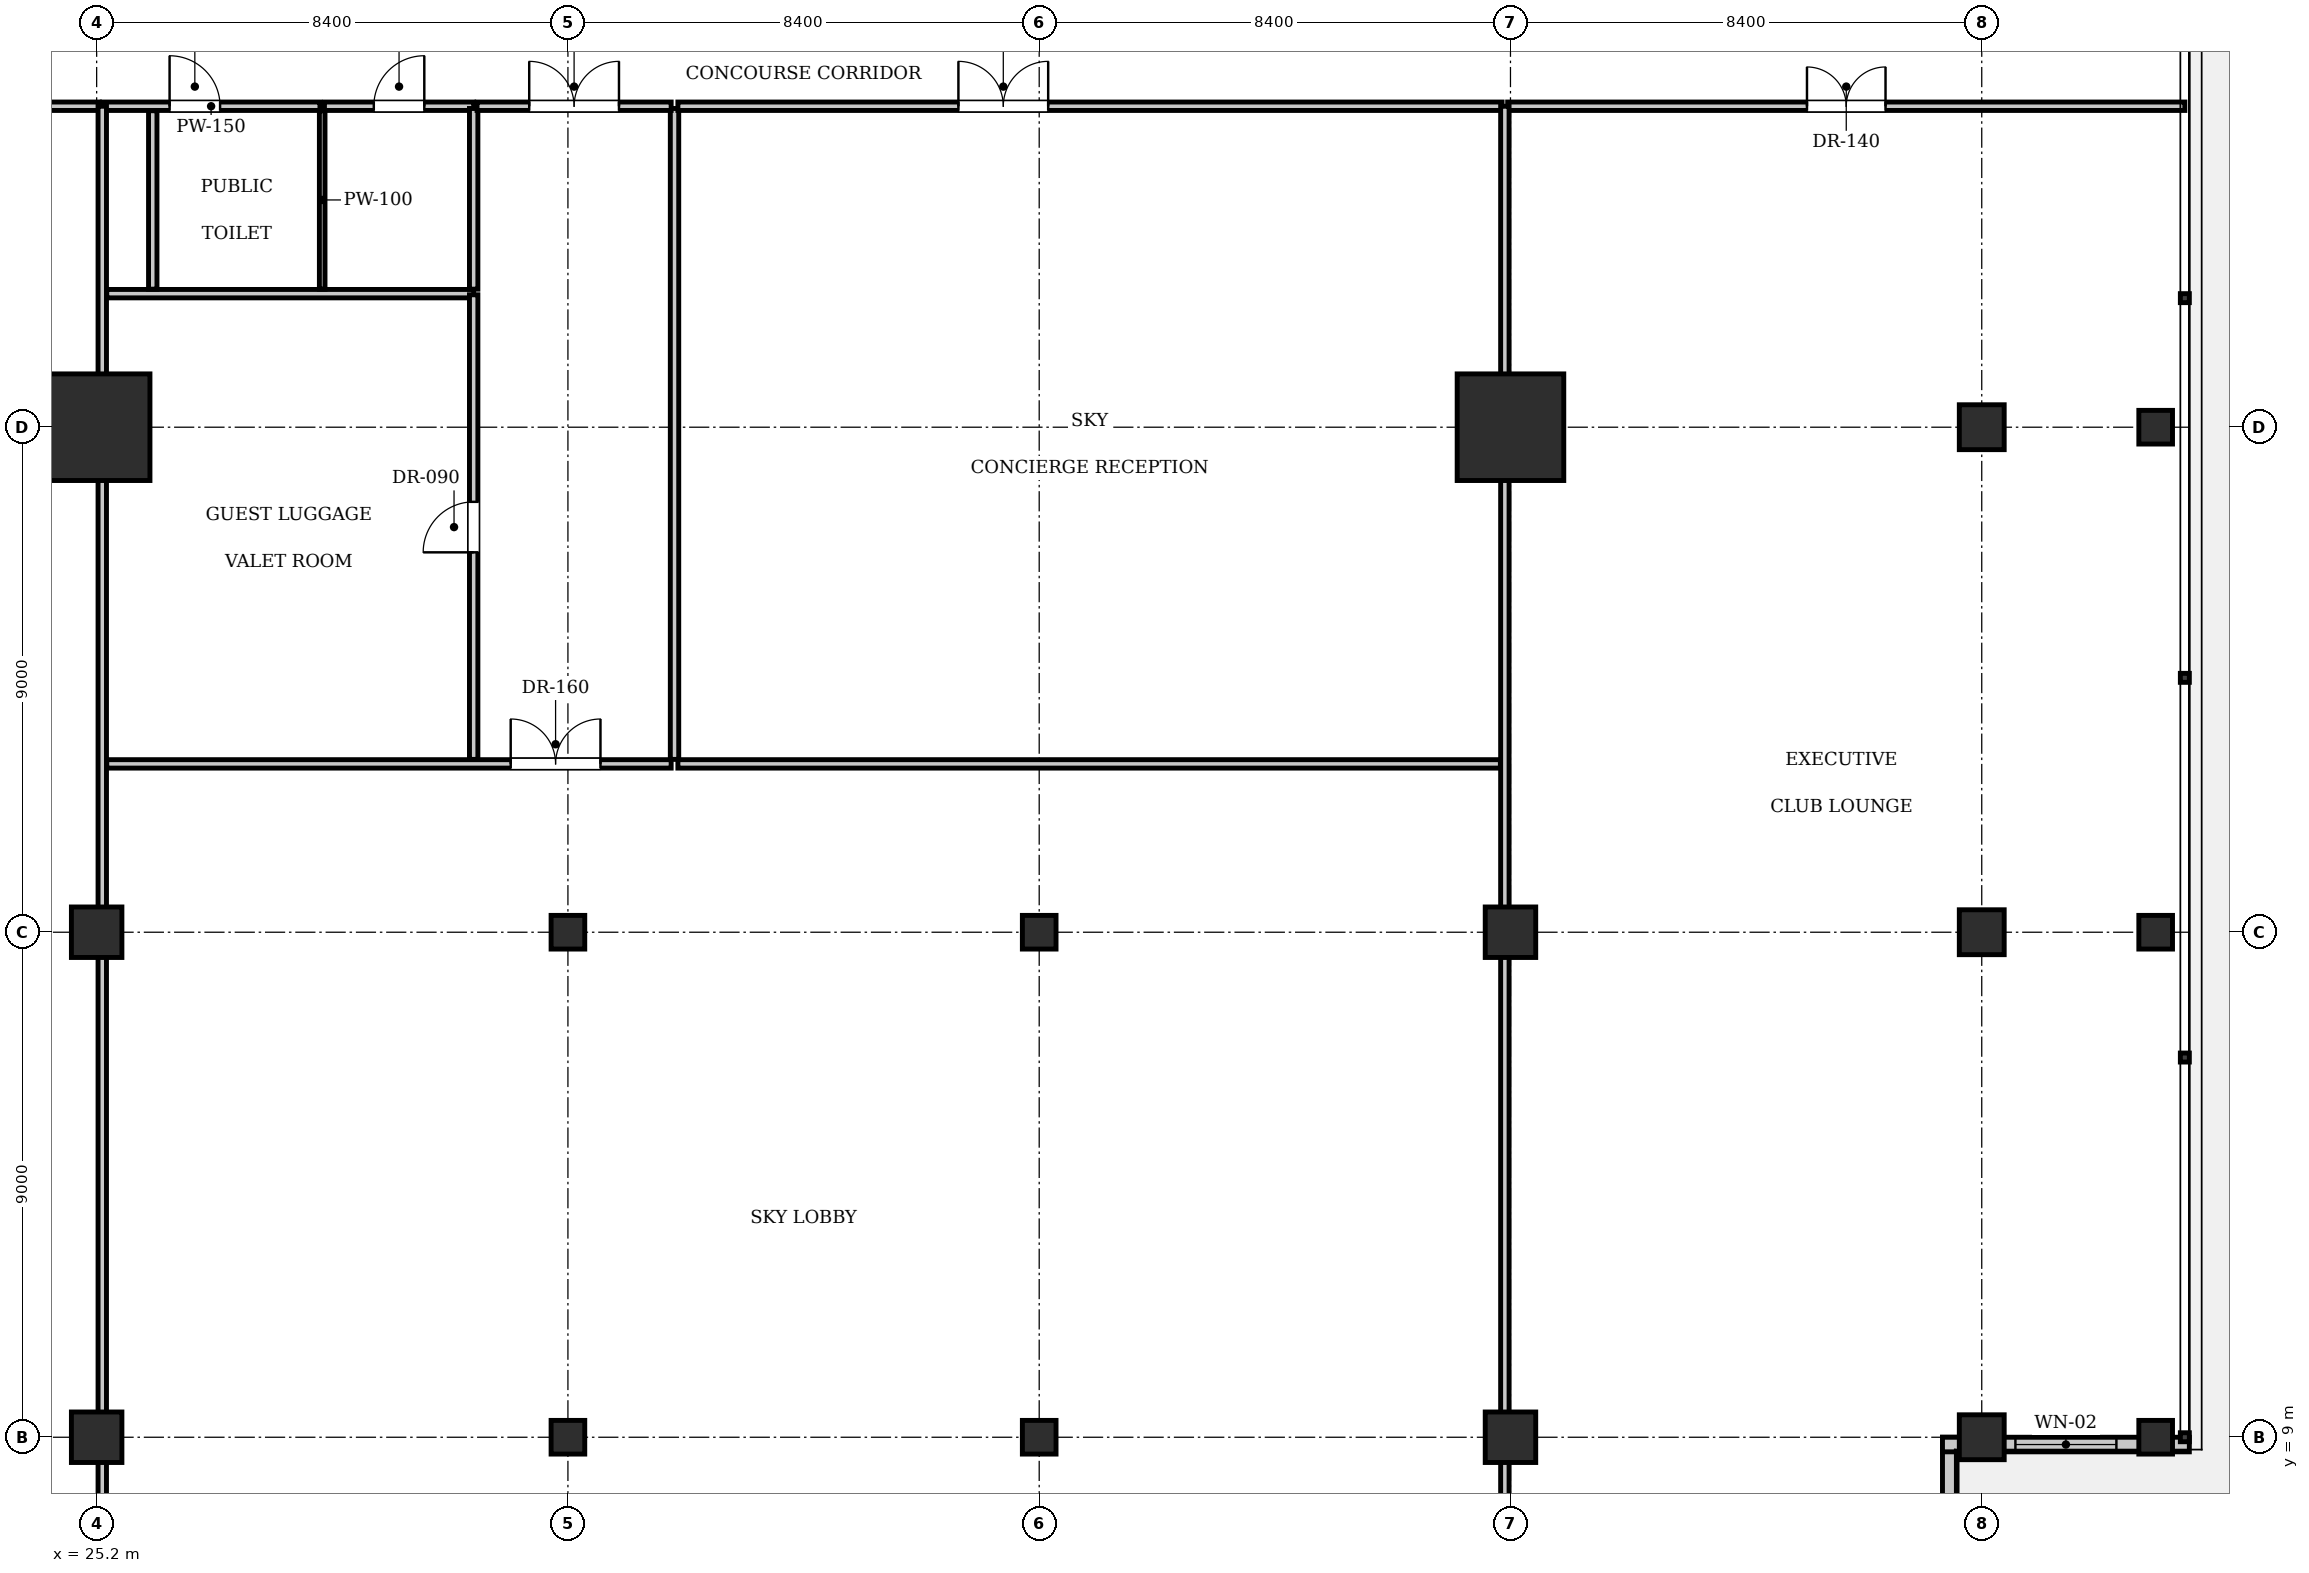
"""IFC4 building model, lengths in metres.
Left out: names, types, materials, properties, quantities, classifications, styles, units other than length and angle.
Written with IfcOpenShell. Run it as: python <this file> out.ifc"""

import sys

from ifc_helpers import new_model, si_unit, direction, frame, frame_2d, origin, origin_2d, place, context, subcontext, project, spatial, rectangle, i_section, extrude, element, fill, save


model = new_model("IFC4")
c1 = context("Model", 3, precision=1e-05, world=origin(), true_north=direction((0.0, 1.0)))
c2 = subcontext(c1, "Body", "Model", "MODEL_VIEW")
j1 = project(units=[si_unit("LENGTHUNIT", "METRE"), si_unit("PLANEANGLEUNIT", "RADIAN")], contexts=[c1])
p1 = place(None, origin())
s1 = spatial("IfcSite", under=j1, at=p1, CompositionType="ELEMENT")
p2 = place(p1, origin())
s2 = spatial("IfcBuilding", under=s1, at=p2, CompositionType="ELEMENT")
p3 = place(p2, frame((0.0, 0.0, 122.5)))
s3 = spatial("IfcBuildingStorey", under=s2, at=p3, CompositionType="ELEMENT", Elevation=122.5)
for number, where, z_axis, x_axis in (
    (1, (25.2, 27.0, 0.0), (0.0, 0.0, 1.0), (1.0, 0.0, 0.0)),
    (2, (50.4, 27.0, 0.0), (0.0, 0.0, 1.0), (1.0, 0.0, 0.0)),
):
    element("IfcColumn", number, at=place(p3, frame(where, z_axis=z_axis, x_axis=x_axis)), inside=s3, PredefinedType="COLUMN", context=c2, shape_type="SweptSolid", body=[
        extrude(rectangle(XDim=1.9, YDim=1.9, at=origin_2d()), origin(), (0.0, 0.0, 1.0), 4.9),
    ])
for number, where, z_axis, x_axis in (
    (3, (25.2, 18.0, 0.0), (0.0, 0.0, 1.0), (1.0, 0.0, 0.0)),
    (4, (50.4, 18.0, 0.0), (0.0, 0.0, 1.0), (1.0, 0.0, 0.0)),
    (5, (25.2, 9.0, 0.0), (0.0, 0.0, 1.0), (1.0, 0.0, 0.0)),
    (6, (50.4, 9.0, 0.0), (0.0, 0.0, 1.0), (1.0, 0.0, 0.0)),
):
    element("IfcColumn", number, at=place(p3, frame(where, z_axis=z_axis, x_axis=x_axis)), inside=s3, PredefinedType="COLUMN", context=c2, shape_type="SweptSolid", body=[
        extrude(rectangle(XDim=0.9, YDim=0.9, at=origin_2d()), origin(), (0.0, 0.0, 1.0), 4.9),
    ])
for number, where, z_axis, x_axis in (
    (7, (33.6, 9.0, 0.0), (0.0, 0.0, 1.0), (1.0, 0.0, 0.0)),
    (8, (42.0, 9.0, 0.0), (0.0, 0.0, 1.0), (1.0, 0.0, 0.0)),
    (9, (33.6, 18.0, 0.0), (0.0, 0.0, 1.0), (1.0, 0.0, 0.0)),
    (10, (42.0, 18.0, 0.0), (0.0, 0.0, 1.0), (1.0, 0.0, 0.0)),
):
    element("IfcColumn", number, at=place(p3, frame(where, z_axis=z_axis, x_axis=x_axis)), inside=s3, PredefinedType="COLUMN", context=c2, shape_type="SweptSolid", body=[
        extrude(i_section(OverallWidth=0.6, OverallDepth=0.6, WebThickness=0.025, FlangeThickness=0.038, at=origin_2d()), origin(), (0.0, 0.0, 1.0), 4.9),
    ])
for number, where, z_axis, x_axis in (
    (11, (58.8, 9.0, 0.0), (0.0, 0.0, 1.0), (1.0, 0.0, 0.0)),
    (12, (58.8, 18.0, 0.0), (0.0, 0.0, 1.0), (1.0, 0.0, 0.0)),
    (13, (58.8, 27.0, 0.0), (0.0, 0.0, 1.0), (1.0, 0.0, 0.0)),
):
    element("IfcColumn", number, at=place(p3, frame(where, z_axis=z_axis, x_axis=x_axis)), inside=s3, PredefinedType="COLUMN", context=c2, shape_type="SweptSolid", body=[
        extrude(rectangle(XDim=0.8, YDim=0.8, at=origin_2d()), origin(), (0.0, 0.0, 1.0), 4.9),
    ])
for number, where, z_axis, x_axis in (
    (14, (61.9, 9.0, -0.24), (0.0, 0.0, 1.0), (1.0, 0.0, 0.0)),
    (15, (61.9, 18.0, -0.24), (0.0, 0.0, 1.0), (1.0, 0.0, 0.0)),
    (16, (61.9, 27.0, -0.24), (0.0, 0.0, 1.0), (1.0, 0.0, 0.0)),
):
    element("IfcColumn", number, at=place(p3, frame(where, z_axis=z_axis, x_axis=x_axis)), inside=s3, PredefinedType="COLUMN", context=c2, shape_type="SweptSolid", body=[
        extrude(i_section(OverallWidth=0.6, OverallDepth=0.6, WebThickness=0.025, FlangeThickness=0.038, at=origin_2d()), origin(), (0.0, 0.0, 1.0), 5.14),
    ])
p4 = place(p3, frame((58.23, 9.0, 0.0), z_axis=(0.0, 0.0, 1.0), x_axis=(0.0, -1.0, 0.0)))
e17 = element("IfcWall", 17, at=p4, inside=s3, PredefinedType="SOLIDWALL", context=c2, shape_type="SweptSolid", body=[
    extrude(rectangle(XDim=4.4, YDim=0.26, at=frame_2d((2.2, 0.0))), origin(), (0.0, 0.0, 1.0), 4.66),
])
p5 = place(p3, frame((62.5, 8.87, 0.0), z_axis=(0.0, 0.0, 1.0), x_axis=(-1.0, 0.0, 0.0)))
e18 = element("IfcWall", 18, at=p5, inside=s3, PredefinedType="SOLIDWALL", context=c2, shape_type="SweptSolid", body=[
    extrude(rectangle(XDim=4.4, YDim=0.26, at=frame_2d((2.2, 0.0))), origin(), (0.0, 0.0, 1.0), 4.048),
])
p6 = place(p5, frame((1.3, 0.0, 0.9)))
e19 = element("IfcOpeningElement", 19, at=p6, cuts=e18, PredefinedType="OPENING", context=c2, shape_type="SweptSolid", body=[
    extrude(rectangle(XDim=1.8, YDim=2.1, at=frame_2d((0.9, 1.05))), frame((0.0, 0.14, 0.0), z_axis=(0.0, -1.0, 0.0), x_axis=(1.0, 0.0, 0.0)), (0.0, 0.0, 1.0), 0.28),
])
p7 = place(p3, frame((25.3, 32.72, 0.0), z_axis=(0.0, 0.0, 1.0), x_axis=(1.0, 0.0, 0.0)))
e20 = element("IfcWall", 20, at=p7, inside=s3, PredefinedType="PARTITIONING", context=c2, shape_type="SweptSolid", body=[
    extrude(rectangle(XDim=3.88, YDim=0.15, at=frame_2d((1.94, 0.0))), origin(), (0.0, 0.0, 1.0), 4.66),
])
p8 = place(p7, frame((1.2, 0.0, 0.0)))
e21 = element("IfcOpeningElement", 21, at=p8, cuts=e20, PredefinedType="OPENING", context=c2, shape_type="SweptSolid", body=[
    extrude(rectangle(XDim=0.9, YDim=2.1, at=frame_2d((0.45, 1.05))), frame((0.0, 0.085, 0.0), z_axis=(0.0, -1.0, 0.0), x_axis=(1.0, 0.0, 0.0)), (0.0, 0.0, 1.0), 0.17),
])
p9 = place(p3, frame((29.26, 32.72, 0.0), z_axis=(0.0, 0.0, 1.0), x_axis=(1.0, 0.0, 0.0)))
e22 = element("IfcWall", 22, at=p9, inside=s3, PredefinedType="PARTITIONING", context=c2, shape_type="SweptSolid", body=[
    extrude(rectangle(XDim=2.66, YDim=0.15, at=frame_2d((1.33, 0.0))), origin(), (0.0, 0.0, 1.0), 4.66),
])
p10 = place(p9, frame((0.88, 0.0, 0.0)))
e23 = element("IfcOpeningElement", 23, at=p10, cuts=e22, PredefinedType="OPENING", context=c2, shape_type="SweptSolid", body=[
    extrude(rectangle(XDim=0.9, YDim=2.1, at=frame_2d((0.45, 1.05))), frame((0.0, 0.085, 0.0), z_axis=(0.0, -1.0, 0.0), x_axis=(1.0, 0.0, 0.0)), (0.0, 0.0, 1.0), 0.17),
])
p11 = place(p3, frame((25.38, 29.38, 0.0), z_axis=(0.0, 0.0, 1.0), x_axis=(1.0, 0.0, 0.0)))
e24 = element("IfcWall", 24, at=p11, inside=s3, PredefinedType="PARTITIONING", context=c2, shape_type="SweptSolid", body=[
    extrude(rectangle(XDim=6.54, YDim=0.15, at=frame_2d((3.27, 0.0))), origin(), (0.0, 0.0, 1.0), 4.66),
])
p12 = place(p3, frame((26.2, 29.46, 0.0), z_axis=(0.0, 0.0, 1.0), x_axis=(0.0, 1.0, 0.0)))
e25 = element("IfcWall", 25, at=p12, inside=s3, PredefinedType="PARTITIONING", context=c2, shape_type="SweptSolid", body=[
    extrude(rectangle(XDim=3.18, YDim=0.15, at=frame_2d((1.59, 0.0))), origin(), (0.0, 0.0, 1.0), 4.66),
])
p13 = place(p3, frame((29.22, 29.46, 0.0), z_axis=(0.0, 0.0, 1.0), x_axis=(0.0, 1.0, 0.0)))
e26 = element("IfcWall", 26, at=p13, inside=s3, PredefinedType="PARTITIONING", context=c2, shape_type="SweptSolid", body=[
    extrude(rectangle(XDim=3.18, YDim=0.1, at=frame_2d((1.59, 0.0))), origin(), (0.0, 0.0, 1.0), 4.66),
])
p14 = place(p3, frame((31.92, 29.46, 0.0), z_axis=(0.0, 0.0, 1.0), x_axis=(0.0, 1.0, 0.0)))
e27 = element("IfcWall", 27, at=p14, inside=s3, PredefinedType="PARTITIONING", context=c2, shape_type="SweptSolid", body=[
    extrude(rectangle(XDim=3.22, YDim=0.15, at=frame_2d((1.61, 0.0))), origin(), (0.0, 0.0, 1.0), 4.66),
])
p15 = place(p3, frame((25.38, 21.0, 0.0), z_axis=(0.0, 0.0, 1.0), x_axis=(1.0, 0.0, 0.0)))
e28 = element("IfcWall", 28, at=p15, inside=s3, PredefinedType="PARTITIONING", context=c2, shape_type="SweptSolid", body=[
    extrude(rectangle(XDim=10.06, YDim=0.15, at=frame_2d((5.03, 0.0))), origin(), (0.0, 0.0, 1.0), 4.66),
])
p16 = place(p15, frame((7.2, 0.0, 0.0)))
e29 = element("IfcOpeningElement", 29, at=p16, cuts=e28, PredefinedType="OPENING", context=c2, shape_type="SweptSolid", body=[
    extrude(rectangle(XDim=1.6, YDim=2.3, at=frame_2d((0.8, 1.15))), frame((0.0, 0.085, 0.0), z_axis=(0.0, -1.0, 0.0), x_axis=(1.0, 0.0, 0.0)), (0.0, 0.0, 1.0), 0.17),
])
p17 = place(p3, frame((35.56, 21.0, 0.0), z_axis=(0.0, 0.0, 1.0), x_axis=(1.0, 0.0, 0.0)))
e30 = element("IfcWall", 30, at=p17, inside=s3, PredefinedType="PARTITIONING", context=c2, shape_type="SweptSolid", body=[
    extrude(rectangle(XDim=14.66, YDim=0.15, at=frame_2d((7.33, 0.0))), origin(), (0.0, 0.0, 1.0), 4.66),
])
p18 = place(p3, frame((35.5, 21.08, 0.0), z_axis=(0.0, 0.0, 1.0), x_axis=(0.0, 1.0, 0.0)))
e31 = element("IfcWall", 31, at=p18, inside=s3, PredefinedType="PARTITIONING", context=c2, shape_type="SweptSolid", body=[
    extrude(rectangle(XDim=11.6, YDim=0.15, at=frame_2d((5.8, 0.0))), origin(), (0.0, 0.0, 1.0), 4.66),
])
p19 = place(p3, frame((31.92, 21.08, 0.0), z_axis=(0.0, 0.0, 1.0), x_axis=(0.0, 1.0, 0.0)))
e32 = element("IfcWall", 32, at=p19, inside=s3, PredefinedType="PARTITIONING", context=c2, shape_type="SweptSolid", body=[
    extrude(rectangle(XDim=8.28, YDim=0.15, at=frame_2d((4.14, 0.0))), origin(), (0.0, 0.0, 1.0), 4.66),
])
p20 = place(p19, frame((3.69, 0.0, 0.0)))
e33 = element("IfcOpeningElement", 33, at=p20, cuts=e32, PredefinedType="OPENING", context=c2, shape_type="SweptSolid", body=[
    extrude(rectangle(XDim=0.9, YDim=2.1, at=frame_2d((0.45, 1.05))), frame((0.0, 0.085, 0.0), z_axis=(0.0, -1.0, 0.0), x_axis=(1.0, 0.0, 0.0)), (0.0, 0.0, 1.0), 0.17),
])
p21 = place(p3, frame((31.98, 32.72, 0.0), z_axis=(0.0, 0.0, 1.0), x_axis=(1.0, 0.0, 0.0)))
e34 = element("IfcWall", 34, at=p21, inside=s3, PredefinedType="PARTITIONING", context=c2, shape_type="SweptSolid", body=[
    extrude(rectangle(XDim=3.46, YDim=0.15, at=frame_2d((1.73, 0.0))), origin(), (0.0, 0.0, 1.0), 4.66),
])
p22 = place(p21, frame((0.93, 0.0, 0.0)))
e35 = element("IfcOpeningElement", 35, at=p22, cuts=e34, PredefinedType="OPENING", context=c2, shape_type="SweptSolid", body=[
    extrude(rectangle(XDim=1.6, YDim=2.3, at=frame_2d((0.8, 1.15))), frame((0.0, 0.085, 0.0), z_axis=(0.0, -1.0, 0.0), x_axis=(1.0, 0.0, 0.0)), (0.0, 0.0, 1.0), 0.17),
])
p23 = place(p3, frame((35.56, 32.72, 0.0), z_axis=(0.0, 0.0, 1.0), x_axis=(1.0, 0.0, 0.0)))
e36 = element("IfcWall", 36, at=p23, inside=s3, PredefinedType="PARTITIONING", context=c2, shape_type="SweptSolid", body=[
    extrude(rectangle(XDim=14.69, YDim=0.15, at=frame_2d((7.345, 0.0))), origin(), (0.0, 0.0, 1.0), 4.66),
])
p24 = place(p23, frame((5.0, 0.0, 0.0)))
e37 = element("IfcOpeningElement", 37, at=p24, cuts=e36, PredefinedType="OPENING", context=c2, shape_type="SweptSolid", body=[
    extrude(rectangle(XDim=1.6, YDim=2.3, at=frame_2d((0.8, 1.15))), frame((0.0, 0.085, 0.0), z_axis=(0.0, -1.0, 0.0), x_axis=(1.0, 0.0, 0.0)), (0.0, 0.0, 1.0), 0.17),
])
p25 = place(p3, frame((13.18, 32.72, 0.0), z_axis=(0.0, 0.0, 1.0), x_axis=(1.0, 0.0, 0.0)))
e38 = element("IfcWall", 38, at=p25, inside=s3, PredefinedType="PARTITIONING", context=c2, shape_type="SweptSolid", body=[
    extrude(rectangle(XDim=12.07, YDim=0.15, at=frame_2d((6.035, 0.0))), origin(), (0.0, 0.0, 1.0), 4.66),
])
p26 = place(p25, frame((5.335, 0.0, 0.0)))
e39 = element("IfcOpeningElement", 39, at=p26, cuts=e38, PredefinedType="OPENING", context=c2, shape_type="SweptSolid", body=[
    extrude(rectangle(XDim=1.4, YDim=2.2, at=frame_2d((0.7, 1.1))), frame((0.0, 0.085, 0.0), z_axis=(0.0, -1.0, 0.0), x_axis=(1.0, 0.0, 0.0)), (0.0, 0.0, 1.0), 0.17),
])
p27 = place(p3, frame((50.35, 32.72, 0.0), z_axis=(0.0, 0.0, 1.0), x_axis=(1.0, 0.0, 0.0)))
e40 = element("IfcWall", 40, at=p27, inside=s3, PredefinedType="PARTITIONING", context=c2, shape_type="SweptSolid", body=[
    extrude(rectangle(XDim=12.07, YDim=0.15, at=frame_2d((6.035, 0.0))), origin(), (0.0, 0.0, 1.0), 4.66),
])
p28 = place(p27, frame((5.335, 0.0, 0.0)))
e41 = element("IfcOpeningElement", 41, at=p28, cuts=e40, PredefinedType="OPENING", context=c2, shape_type="SweptSolid", body=[
    extrude(rectangle(XDim=1.4, YDim=2.2, at=frame_2d((0.7, 1.1))), frame((0.0, 0.085, 0.0), z_axis=(0.0, -1.0, 0.0), x_axis=(1.0, 0.0, 0.0)), (0.0, 0.0, 1.0), 0.17),
])
for number, where, z_axis, x_axis in (
    (42, (25.3, 4.68, 0.0), (0.0, 0.0, 1.0), (0.0, 1.0, 0.0)),
    (43, (50.3, 4.68, 0.0), (0.0, 0.0, 1.0), (0.0, 1.0, 0.0)),
):
    element("IfcWall", number, at=place(p3, frame(where, z_axis=z_axis, x_axis=x_axis)), inside=s3, PredefinedType="PARTITIONING", context=c2, shape_type="SweptSolid", body=[
        extrude(rectangle(XDim=28.04, YDim=0.15, at=frame_2d((14.02, 0.0))), origin(), (0.0, 0.0, 1.0), 4.048),
    ])
p29 = place(p6, origin())
e44 = element("IfcWindow", 44, at=p29, inside=s3, PartitioningType="SINGLE_PANEL", PredefinedType="WINDOW", context=c2, shape_type="SweptSolid", body=[
    extrude(rectangle(XDim=1.8, YDim=2.1, at=frame_2d((0.9, 1.05))), frame((0.0, 0.03, 0.0), z_axis=(0.0, -1.0, 0.0), x_axis=(1.0, 0.0, 0.0)), (0.0, 0.0, 1.0), 0.06),
])
fill(e19, e44)
p30 = place(p8, origin())
e45 = element("IfcDoor", 45, at=p30, inside=s3, OperationType="SINGLE_SWING_LEFT", PredefinedType="DOOR", context=c2, shape_type="SweptSolid", body=[
    extrude(rectangle(XDim=0.9, YDim=2.1, at=frame_2d((0.45, 1.05))), frame((0.0, 0.025, 0.0), z_axis=(0.0, -1.0, 0.0), x_axis=(1.0, 0.0, 0.0)), (0.0, 0.0, 1.0), 0.05),
])
fill(e21, e45)
p31 = place(p10, origin())
e46 = element("IfcDoor", 46, at=p31, inside=s3, OperationType="SINGLE_SWING_RIGHT", PredefinedType="DOOR", context=c2, shape_type="SweptSolid", body=[
    extrude(rectangle(XDim=0.9, YDim=2.1, at=frame_2d((0.45, 1.05))), frame((0.0, 0.025, 0.0), z_axis=(0.0, -1.0, 0.0), x_axis=(1.0, 0.0, 0.0)), (0.0, 0.0, 1.0), 0.05),
])
fill(e23, e46)
p32 = place(p16, origin())
e47 = element("IfcDoor", 47, at=p32, inside=s3, OperationType="DOUBLE_DOOR_SINGLE_SWING", PredefinedType="DOOR", context=c2, shape_type="SweptSolid", body=[
    extrude(rectangle(XDim=1.6, YDim=2.3, at=frame_2d((0.8, 1.15))), frame((0.0, 0.025, 0.0), z_axis=(0.0, -1.0, 0.0), x_axis=(1.0, 0.0, 0.0)), (0.0, 0.0, 1.0), 0.05),
])
fill(e29, e47)
p33 = place(p22, origin())
e48 = element("IfcDoor", 48, at=p33, inside=s3, OperationType="DOUBLE_DOOR_SINGLE_SWING", PredefinedType="DOOR", context=c2, shape_type="SweptSolid", body=[
    extrude(rectangle(XDim=1.6, YDim=2.3, at=frame_2d((0.8, 1.15))), frame((0.0, 0.025, 0.0), z_axis=(0.0, -1.0, 0.0), x_axis=(1.0, 0.0, 0.0)), (0.0, 0.0, 1.0), 0.05),
])
fill(e35, e48)
p34 = place(p20, origin())
e49 = element("IfcDoor", 49, at=p34, inside=s3, OperationType="SINGLE_SWING_LEFT", PredefinedType="DOOR", context=c2, shape_type="SweptSolid", body=[
    extrude(rectangle(XDim=0.9, YDim=2.1, at=frame_2d((0.45, 1.05))), frame((0.0, 0.025, 0.0), z_axis=(0.0, -1.0, 0.0), x_axis=(1.0, 0.0, 0.0)), (0.0, 0.0, 1.0), 0.05),
])
fill(e33, e49)
p35 = place(p24, origin())
e50 = element("IfcDoor", 50, at=p35, inside=s3, OperationType="DOUBLE_DOOR_SINGLE_SWING", PredefinedType="DOOR", context=c2, shape_type="SweptSolid", body=[
    extrude(rectangle(XDim=1.6, YDim=2.3, at=frame_2d((0.8, 1.15))), frame((0.0, 0.025, 0.0), z_axis=(0.0, -1.0, 0.0), x_axis=(1.0, 0.0, 0.0)), (0.0, 0.0, 1.0), 0.05),
])
fill(e37, e50)
p36 = place(p28, origin())
e51 = element("IfcDoor", 51, at=p36, inside=s3, OperationType="DOUBLE_DOOR_SINGLE_SWING", PredefinedType="DOOR", context=c2, shape_type="SweptSolid", body=[
    extrude(rectangle(XDim=1.4, YDim=2.2, at=frame_2d((0.7, 1.1))), frame((0.0, 0.025, 0.0), z_axis=(0.0, -1.0, 0.0), x_axis=(1.0, 0.0, 0.0)), (0.0, 0.0, 1.0), 0.05),
])
fill(e41, e51)
save(model, sys.argv[1])
